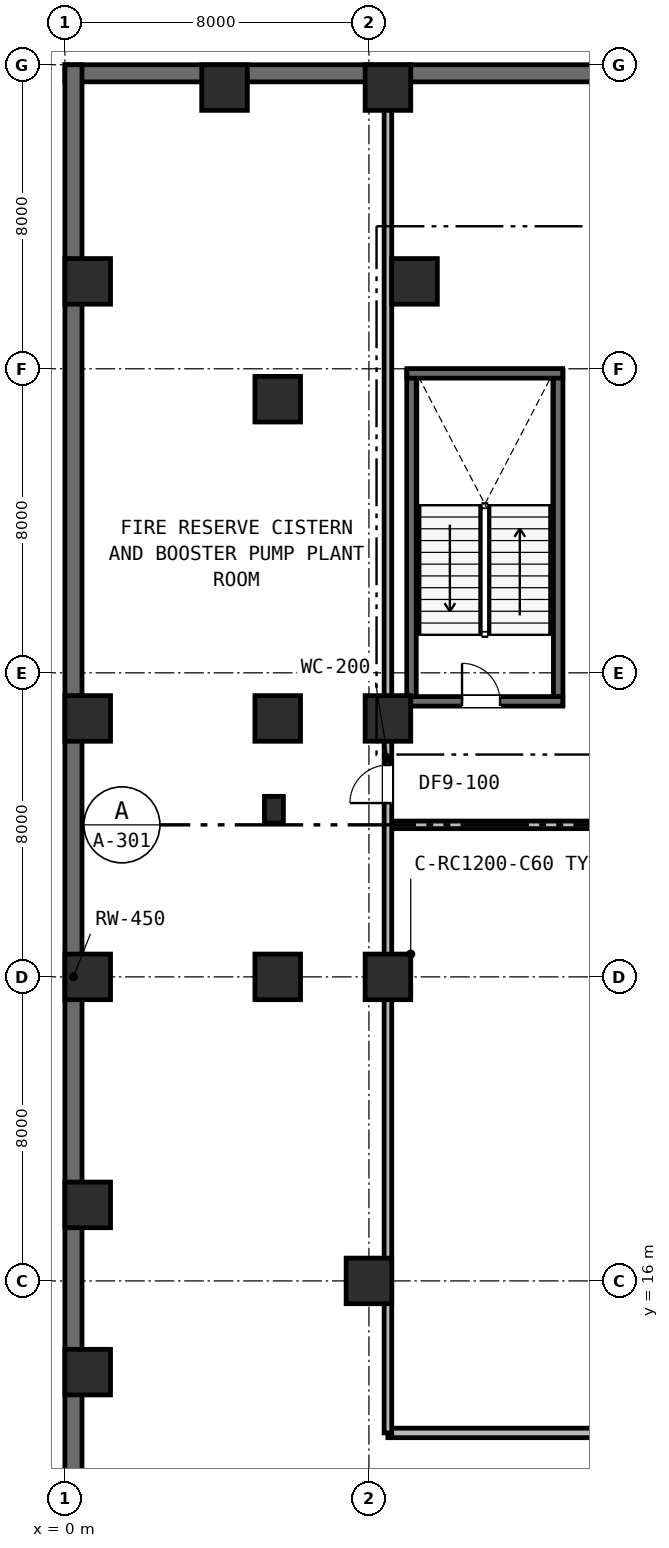
"""IFC4 building model, lengths in metres.
Left out: names, types, materials, properties, quantities, classifications, styles, units other than length and angle.
Written with IfcOpenShell. Run it as: python <this file> out.ifc"""

import sys

from ifc_helpers import new_model, si_unit, direction, frame, frame_2d, origin, origin_2d, place, context, subcontext, project, spatial, rectangle, extrude, element, fill, save


model = new_model("IFC4")
c1 = context("Model", 3, precision=1e-05, world=origin(), true_north=direction((0.0, 1.0)))
c2 = subcontext(c1, "Body", "Model", "MODEL_VIEW")
j1 = project(units=[si_unit("LENGTHUNIT", "METRE"), si_unit("PLANEANGLEUNIT", "RADIAN")], contexts=[c1])
p1 = place(None, origin())
s1 = spatial("IfcSite", under=j1, at=p1, CompositionType="ELEMENT")
p2 = place(p1, origin())
s2 = spatial("IfcBuilding", under=s1, at=p2, CompositionType="ELEMENT")
p3 = place(p2, frame((0.0, 0.0, -9.4)))
s3 = spatial("IfcBuildingStorey", under=s2, at=p3, CompositionType="ELEMENT", Elevation=-9.4)
p4 = place(p3, frame((0.0, 47.775, 0.0), z_axis=(0.0, 0.0, 1.0), x_axis=(1.0, 0.0, 0.0)))
e1 = element("IfcWall", 1, at=p4, inside=s3, PredefinedType="USERDEFINED", context=c2, shape_type="SweptSolid", body=[
    extrude(rectangle(XDim=56.0, YDim=0.45, at=frame_2d((28.0, 0.0))), origin(), (0.0, 0.0, 1.0), 3.8),
])
p5 = place(p3, frame((0.225, 0.0, 0.0), z_axis=(0.0, 0.0, 1.0), x_axis=(0.0, 1.0, 0.0)))
e2 = element("IfcWall", 2, at=p5, inside=s3, PredefinedType="USERDEFINED", context=c2, shape_type="SweptSolid", body=[
    extrude(rectangle(XDim=48.0, YDim=0.45, at=frame_2d((24.0, 0.0))), origin(), (0.0, 0.0, 1.0), 3.8),
])
for number, where, z_axis, x_axis in (
    (3, (9.12, 31.15, 0.0), (0.0, 0.0, 1.0), (0.0, 1.0, 0.0)),
    (4, (12.98, 31.15, 0.0), (0.0, 0.0, 1.0), (0.0, 1.0, 0.0)),
):
    element("IfcWall", number, at=place(p3, frame(where, z_axis=z_axis, x_axis=x_axis)), inside=s3, PredefinedType="SHEAR", context=c2, shape_type="SweptSolid", body=[
        extrude(rectangle(XDim=8.8, YDim=0.25, at=frame_2d((4.4, 0.0))), origin(), (0.0, 0.0, 1.0), 3.8),
    ])
p6 = place(p3, frame((9.0, 39.88, 0.0), z_axis=(0.0, 0.0, 1.0), x_axis=(1.0, 0.0, 0.0)))
e5 = element("IfcWall", 5, at=p6, inside=s3, PredefinedType="SHEAR", context=c2, shape_type="SweptSolid", body=[
    extrude(rectangle(XDim=4.1, YDim=0.25, at=frame_2d((2.05, 0.0))), origin(), (0.0, 0.0, 1.0), 3.8),
])
p7 = place(p3, frame((9.0, 31.25, 0.0), z_axis=(0.0, 0.0, 1.0), x_axis=(1.0, 0.0, 0.0)))
e6 = element("IfcWall", 6, at=p7, inside=s3, PredefinedType="SHEAR", context=c2, shape_type="SweptSolid", body=[
    extrude(rectangle(XDim=4.1, YDim=0.25, at=frame_2d((2.05, 0.0))), origin(), (0.0, 0.0, 1.0), 3.8),
])
p8 = place(p7, frame((1.45, 0.0, 0.0)))
e7 = element("IfcOpeningElement", 7, at=p8, cuts=e6, PredefinedType="OPENING", context=c2, shape_type="SweptSolid", body=[
    extrude(rectangle(XDim=1.0, YDim=2.15, at=frame_2d((0.5, 1.075))), frame((0.0, 0.135, 0.0), z_axis=(0.0, -1.0, 0.0), x_axis=(1.0, 0.0, 0.0)), (0.0, 0.0, 1.0), 0.27),
])
for number, where, z_axis, x_axis in (
    (8, (8.5, 24.0, 0.0), (0.0, 0.0, 1.0), (1.0, 0.0, 0.0)),
    (9, (5.6, 24.0, 0.0), (0.0, 0.0, 1.0), (1.0, 0.0, 0.0)),
    (10, (5.6, 30.8, 0.0), (0.0, 0.0, 1.0), (1.0, 0.0, 0.0)),
    (11, (5.6, 39.2, 0.0), (0.0, 0.0, 1.0), (1.0, 0.0, 0.0)),
    (12, (8.5, 30.8, 0.0), (0.0, 0.0, 1.0), (1.0, 0.0, 0.0)),
    (13, (9.2, 42.3, 0.0), (0.0, 0.0, 1.0), (1.0, 0.0, 0.0)),
    (14, (0.6, 24.0, 0.0), (0.0, 0.0, 1.0), (1.0, 0.0, 0.0)),
    (15, (0.6, 30.8, 0.0), (0.0, 0.0, 1.0), (1.0, 0.0, 0.0)),
    (16, (0.6, 42.3, 0.0), (0.0, 0.0, 1.0), (1.0, 0.0, 0.0)),
    (17, (4.2, 47.4, 0.0), (0.0, 0.0, 1.0), (1.0, 0.0, 0.0)),
    (18, (8.5, 47.4, 0.0), (0.0, 0.0, 1.0), (1.0, 0.0, 0.0)),
    (19, (0.6, 13.6, 0.0), (0.0, 0.0, 1.0), (1.0, 0.0, 0.0)),
    (20, (0.6, 18.0, 0.0), (0.0, 0.0, 1.0), (1.0, 0.0, 0.0)),
    (21, (8.0, 16.0, 0.0), (0.0, 0.0, 1.0), (1.0, 0.0, 0.0)),
):
    element("IfcColumn", number, at=place(p3, frame(where, z_axis=z_axis, x_axis=x_axis)), inside=s3, PredefinedType="COLUMN", context=c2, shape_type="SweptSolid", body=[
        extrude(rectangle(XDim=1.2, YDim=1.2, at=origin_2d()), origin(), (0.0, 0.0, 1.0), 3.8),
    ])
p9 = place(p3, frame((8.5, 12.0, 0.0), z_axis=(0.0, 0.0, 1.0), x_axis=(1.0, 0.0, 0.0)))
e22 = element("IfcWall", 22, at=p9, inside=s3, PredefinedType="STANDARD", context=c2, shape_type="SweptSolid", body=[
    extrude(rectangle(XDim=32.3, YDim=0.25, at=frame_2d((16.15, 0.0))), origin(), (0.0, 0.0, 1.0), 3.15),
])
p10 = place(p9, frame((9.5, 0.0, 0.0)))
e23 = element("IfcOpeningElement", 23, at=p10, cuts=e22, PredefinedType="OPENING", context=c2, shape_type="SweptSolid", body=[
    extrude(rectangle(XDim=4.2, YDim=2.95, at=frame_2d((2.1, 1.475))), frame((0.0, 0.135, 0.0), z_axis=(0.0, -1.0, 0.0), x_axis=(1.0, 0.0, 0.0)), (0.0, 0.0, 1.0), 0.27),
])
p11 = place(p3, frame((8.5, 28.0, 0.0), z_axis=(0.0, 0.0, 1.0), x_axis=(1.0, 0.0, 0.0)))
e24 = element("IfcWall", 24, at=p11, inside=s3, PredefinedType="PARTITIONING", context=c2, shape_type="SweptSolid", body=[
    extrude(rectangle(XDim=32.3, YDim=0.2, at=frame_2d((16.15, 0.0))), origin(), (0.0, 0.0, 1.0), 2.88),
])
p12 = place(p11, frame((16.0, 0.0, 0.0)))
e25 = element("IfcOpeningElement", 25, at=p12, cuts=e24, PredefinedType="OPENING", context=c2, shape_type="SweptSolid", body=[
    extrude(rectangle(XDim=1.1, YDim=2.15, at=frame_2d((0.55, 1.075))), frame((0.0, 0.11, 0.0), z_axis=(0.0, -1.0, 0.0), x_axis=(1.0, 0.0, 0.0)), (0.0, 0.0, 1.0), 0.22),
])
p13 = place(p3, frame((8.5, 12.0, 0.0), z_axis=(0.0, 0.0, 1.0), x_axis=(0.0, 1.0, 0.0)))
e26 = element("IfcWall", 26, at=p13, inside=s3, PredefinedType="PARTITIONING", context=c2, shape_type="SweptSolid", body=[
    extrude(rectangle(XDim=35.45, YDim=0.2, at=frame_2d((17.725, 0.0))), origin(), (0.0, 0.0, 1.0), 2.63),
])
p14 = place(p13, frame((16.574, 0.0, 0.0)))
e27 = element("IfcOpeningElement", 27, at=p14, cuts=e26, PredefinedType="OPENING", context=c2, shape_type="SweptSolid", body=[
    extrude(rectangle(XDim=1.0, YDim=2.15, at=frame_2d((0.5, 1.075))), frame((0.0, 0.11, 0.0), z_axis=(0.0, -1.0, 0.0), x_axis=(1.0, 0.0, 0.0)), (0.0, 0.0, 1.0), 0.22),
])
p15 = place(p3, frame((5.5, 28.4, 0.0), z_axis=(0.0, 0.0, 1.0), x_axis=(1.0, 0.0, 0.0)))
e28 = element("IfcColumn", 28, at=p15, inside=s3, PredefinedType="PILASTER", context=c2, shape_type="SweptSolid", body=[
    extrude(rectangle(XDim=0.5, YDim=0.7, at=origin_2d()), origin(), (0.0, 0.0, 1.0), 3.5),
])
p16 = place(p8, origin())
e29 = element("IfcDoor", 29, at=p16, inside=s3, OperationType="SINGLE_SWING_LEFT", PredefinedType="DOOR", context=c2, shape_type="SweptSolid", body=[
    extrude(rectangle(XDim=1.0, YDim=2.15, at=frame_2d((0.5, 1.075))), frame((0.0, 0.025, 0.0), z_axis=(0.0, -1.0, 0.0), x_axis=(1.0, 0.0, 0.0)), (0.0, 0.0, 1.0), 0.05),
])
fill(e7, e29)
p17 = place(p14, origin())
e30 = element("IfcDoor", 30, at=p17, inside=s3, OperationType="SINGLE_SWING_LEFT", PredefinedType="DOOR", context=c2, shape_type="SweptSolid", body=[
    extrude(rectangle(XDim=1.0, YDim=2.15, at=frame_2d((0.5, 1.075))), frame((0.0, 0.025, 0.0), z_axis=(0.0, -1.0, 0.0), x_axis=(1.0, 0.0, 0.0)), (0.0, 0.0, 1.0), 0.05),
])
fill(e27, e30)
save(model, sys.argv[1])
